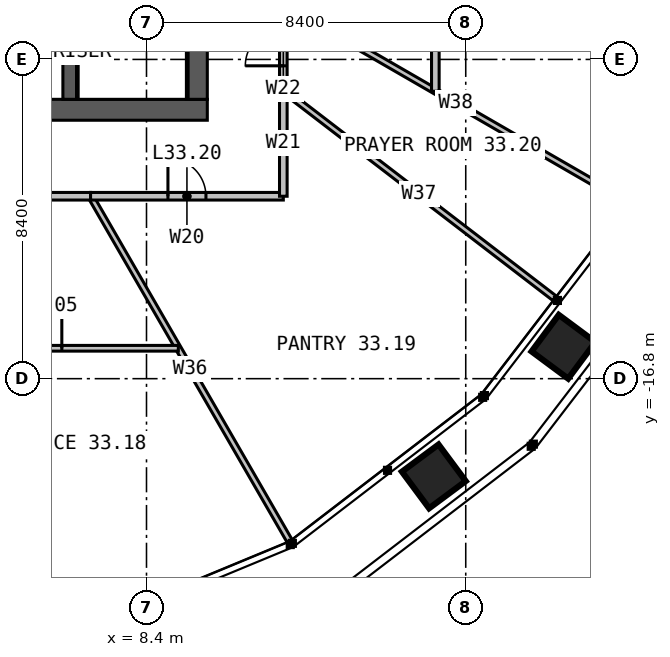
"""IFC4 building model, lengths in metres.
Left out: names, types, materials, properties, quantities, classifications, styles, units other than length and angle.
Written with IfcOpenShell. Run it as: python <this file> out.ifc"""

import sys

from ifc_helpers import new_model, si_unit, direction, frame, frame_2d, origin, place, context, subcontext, project, spatial, rectangle, extrude, element, fill, save


model = new_model("IFC4")
c1 = context("Model", 3, precision=1e-05, world=origin(), true_north=direction((0.0, 1.0)))
c2 = subcontext(c1, "Body", "Model", "MODEL_VIEW")
j1 = project(units=[si_unit("LENGTHUNIT", "METRE"), si_unit("PLANEANGLEUNIT", "RADIAN")], contexts=[c1])
p1 = place(None, origin())
s1 = spatial("IfcSite", under=j1, at=p1, CompositionType="ELEMENT")
p2 = place(p1, origin())
s2 = spatial("IfcBuilding", under=s1, at=p2, CompositionType="ELEMENT")
p3 = place(p2, frame((0.0, 0.0, 138.0)))
s3 = spatial("IfcBuildingStorey", under=s2, at=p3, CompositionType="ELEMENT", Elevation=138.0)
p4 = place(p3, frame((10.0, -9.725, 0.0), z_axis=(0.0, 0.0, 1.0), x_axis=(-1.0, 0.0, 0.0)))
e1 = element("IfcWall", 1, at=p4, inside=s3, PredefinedType="SOLIDWALL", context=c2, shape_type="SweptSolid", body=[
    extrude(rectangle(XDim=20.0, YDim=0.55, at=frame_2d((10.0, 0.0))), origin(), (0.0, 0.0, 1.0), 4.0),
])
p5 = place(p4, frame((6.875, 0.0, 0.0)))
e2 = element("IfcOpeningElement", 2, at=p5, cuts=e1, PredefinedType="OPENING", context=c2, shape_type="SweptSolid", body=[
    extrude(rectangle(XDim=1.2, YDim=2.2, at=frame_2d((0.6, 1.1))), frame((0.0, 0.285, 0.0), z_axis=(0.0, -1.0, 0.0), x_axis=(1.0, 0.0, 0.0)), (0.0, 0.0, 1.0), 0.57),
])
p6 = place(p3, frame((9.725, -9.45, 0.0), z_axis=(0.0, 0.0, 1.0), x_axis=(0.0, 1.0, 0.0)))
e3 = element("IfcWall", 3, at=p6, inside=s3, PredefinedType="SOLIDWALL", context=c2, shape_type="SweptSolid", body=[
    extrude(rectangle(XDim=18.9, YDim=0.55, at=frame_2d((9.45, 0.0))), origin(), (0.0, 0.0, 1.0), 4.0),
])
p7 = place(p3, frame((6.4, 9.45, 0.0), z_axis=(0.0, 0.0, 1.0), x_axis=(0.0, -1.0, 0.0)))
e4 = element("IfcWall", 4, at=p7, inside=s3, PredefinedType="SOLIDWALL", context=c2, shape_type="SweptSolid", body=[
    extrude(rectangle(XDim=18.9, YDim=0.4, at=frame_2d((9.45, 0.0))), origin(), (0.0, 0.0, 1.0), 4.0),
])
p8 = place(p7, frame((8.95, 0.0, 0.0)))
e5 = element("IfcOpeningElement", 5, at=p8, cuts=e4, PredefinedType="OPENING", context=c2, shape_type="SweptSolid", body=[
    extrude(rectangle(XDim=1.0, YDim=2.2, at=frame_2d((0.5, 1.1))), frame((0.0, 0.21, 0.0), z_axis=(0.0, -1.0, 0.0), x_axis=(1.0, 0.0, 0.0)), (0.0, 0.0, 1.0), 0.42),
])
for number, where, z_axis, x_axis in (
    (6, (12.0, -6.928, 0.0), (0.0, 0.0, 1.0), (0.866, -0.5, 0.0)),
    (7, (6.928, -12.0, 0.0), (0.0, 0.0, 1.0), (0.5, -0.866, 0.0)),
):
    element("IfcWall", number, at=place(p3, frame(where, z_axis=z_axis, x_axis=x_axis)), inside=s3, PredefinedType="PARTITIONING", context=c2, shape_type="SweptSolid", body=[
        extrude(rectangle(XDim=10.478, YDim=0.15, at=frame_2d((5.239, 0.0))), origin(), (0.0, 0.0, 1.0), 2.79),
    ])
p9 = place(p3, frame((12.0, -9.208, 0.0), z_axis=(0.0, 0.0, 1.0), x_axis=(0.79335350297, -0.608761217002, 0.0)))
e8 = element("IfcWall", 8, at=p9, inside=s3, PredefinedType="PARTITIONING", context=c2, shape_type="SweptSolid", body=[
    extrude(rectangle(XDim=9.0, YDim=0.15, at=frame_2d((4.5, 0.0))), origin(), (0.0, 0.0, 1.0), 2.79),
])
p10 = place(p3, frame((16.0, -9.238, 0.0), z_axis=(0.0, 0.0, 1.0), x_axis=(0.0, 1.0, 0.0)))
e9 = element("IfcWall", 9, at=p10, inside=s3, PredefinedType="PARTITIONING", context=c2, shape_type="SweptSolid", body=[
    extrude(rectangle(XDim=2.802, YDim=0.2, at=frame_2d((1.401, 0.0))), origin(), (0.0, 0.0, 1.0), 3.8),
])
p11 = place(p3, frame((-9.238, -16.0, 0.0), z_axis=(0.0, 0.0, 1.0), x_axis=(1.0, 0.0, 0.0)))
e10 = element("IfcWall", 10, at=p11, inside=s3, PredefinedType="PARTITIONING", context=c2, shape_type="SweptSolid", body=[
    extrude(rectangle(XDim=18.475, YDim=0.15, at=frame_2d((9.238, 0.0))), origin(), (0.0, 0.0, 1.0), 2.79),
])
p12 = place(p11, frame((3.066, 0.0, 0.0)))
e11 = element("IfcOpeningElement", 11, at=p12, cuts=e10, PredefinedType="OPENING", context=c2, shape_type="SweptSolid", body=[
    extrude(rectangle(XDim=1.0, YDim=2.2, at=frame_2d((0.5, 1.1))), frame((0.0, 0.085, 0.0), z_axis=(0.0, -1.0, 0.0), x_axis=(1.0, 0.0, 0.0)), (0.0, 0.0, 1.0), 0.17),
])
p13 = place(p11, frame((8.738, 0.0, 0.0)))
e12 = element("IfcOpeningElement", 12, at=p13, cuts=e10, PredefinedType="OPENING", context=c2, shape_type="SweptSolid", body=[
    extrude(rectangle(XDim=1.0, YDim=2.2, at=frame_2d((0.5, 1.1))), frame((0.0, 0.085, 0.0), z_axis=(0.0, -1.0, 0.0), x_axis=(1.0, 0.0, 0.0)), (0.0, 0.0, 1.0), 0.17),
])
p14 = place(p11, frame((14.41, 0.0, 0.0)))
e13 = element("IfcOpeningElement", 13, at=p14, cuts=e10, PredefinedType="OPENING", context=c2, shape_type="SweptSolid", body=[
    extrude(rectangle(XDim=1.0, YDim=2.2, at=frame_2d((0.5, 1.1))), frame((0.0, 0.085, 0.0), z_axis=(0.0, -1.0, 0.0), x_axis=(1.0, 0.0, 0.0)), (0.0, 0.0, 1.0), 0.17),
])
p15 = place(p3, frame((-6.928, -12.0, 0.0), z_axis=(0.0, 0.0, 1.0), x_axis=(1.0, 0.0, 0.0)))
e14 = element("IfcWall", 14, at=p15, inside=s3, PredefinedType="PARTITIONING", context=c2, shape_type="SweptSolid", body=[
    extrude(rectangle(XDim=13.856, YDim=0.2, at=frame_2d((6.928, 0.0))), origin(), (0.0, 0.0, 1.0), 3.8),
])
p16 = place(p15, frame((6.028, 0.0, 0.0)))
e15 = element("IfcOpeningElement", 15, at=p16, cuts=e14, PredefinedType="OPENING", context=c2, shape_type="SweptSolid", body=[
    extrude(rectangle(XDim=1.8, YDim=2.2, at=frame_2d((0.9, 1.1))), frame((0.0, 0.11, 0.0), z_axis=(0.0, -1.0, 0.0), x_axis=(1.0, 0.0, 0.0)), (0.0, 0.0, 1.0), 0.22),
])
p17 = place(p3, frame((6.928, -12.0, 0.0), z_axis=(0.0, 0.0, 1.0), x_axis=(1.0, 0.0, 0.0)))
e16 = element("IfcWall", 16, at=p17, inside=s3, PredefinedType="PARTITIONING", context=c2, shape_type="SweptSolid", body=[
    extrude(rectangle(XDim=5.072, YDim=0.2, at=frame_2d((2.536, 0.0))), origin(), (0.0, 0.0, 1.0), 3.8),
])
p18 = place(p17, frame((2.036, 0.0, 0.0)))
e17 = element("IfcOpeningElement", 17, at=p18, cuts=e16, PredefinedType="OPENING", context=c2, shape_type="SweptSolid", body=[
    extrude(rectangle(XDim=1.0, YDim=2.2, at=frame_2d((0.5, 1.1))), frame((0.0, 0.11, 0.0), z_axis=(0.0, -1.0, 0.0), x_axis=(1.0, 0.0, 0.0)), (0.0, 0.0, 1.0), 0.22),
])
p19 = place(p3, frame((12.0, -12.0, 0.0), z_axis=(0.0, 0.0, 1.0), x_axis=(0.0, 1.0, 0.0)))
e18 = element("IfcWall", 18, at=p19, inside=s3, PredefinedType="PARTITIONING", context=c2, shape_type="SweptSolid", body=[
    extrude(rectangle(XDim=2.792, YDim=0.2, at=frame_2d((1.396, 0.0))), origin(), (0.0, 0.0, 1.0), 3.8),
])
p20 = place(p3, frame((12.0, -9.208, 0.0), z_axis=(0.0, 0.0, 1.0), x_axis=(0.0, 1.0, 0.0)))
e19 = element("IfcWall", 19, at=p20, inside=s3, PredefinedType="PARTITIONING", context=c2, shape_type="SweptSolid", body=[
    extrude(rectangle(XDim=2.28, YDim=0.2, at=frame_2d((1.14, 0.0))), origin(), (0.0, 0.0, 1.0), 3.8),
])
p21 = place(p20, frame((0.64, 0.0, 0.0)))
e20 = element("IfcOpeningElement", 20, at=p21, cuts=e19, PredefinedType="OPENING", context=c2, shape_type="SweptSolid", body=[
    extrude(rectangle(XDim=1.0, YDim=2.2, at=frame_2d((0.5, 1.1))), frame((0.0, 0.11, 0.0), z_axis=(0.0, -1.0, 0.0), x_axis=(1.0, 0.0, 0.0)), (0.0, 0.0, 1.0), 0.22),
])
p22 = place(p14, origin())
e21 = element("IfcDoor", 21, at=p22, inside=s3, OperationType="SINGLE_SWING_RIGHT", PredefinedType="DOOR", context=c2, shape_type="SweptSolid", body=[
    extrude(rectangle(XDim=1.0, YDim=2.2, at=frame_2d((0.5, 1.1))), frame((0.0, 0.025, 0.0), z_axis=(0.0, -1.0, 0.0), x_axis=(1.0, 0.0, 0.0)), (0.0, 0.0, 1.0), 0.05),
])
fill(e13, e21)
p23 = place(p18, origin())
e22 = element("IfcDoor", 22, at=p23, inside=s3, OperationType="SINGLE_SWING_LEFT", PredefinedType="DOOR", context=c2, shape_type="SweptSolid", body=[
    extrude(rectangle(XDim=1.0, YDim=2.2, at=frame_2d((0.5, 1.1))), frame((0.0, 0.025, 0.0), z_axis=(0.0, -1.0, 0.0), x_axis=(1.0, 0.0, 0.0)), (0.0, 0.0, 1.0), 0.05),
])
fill(e17, e22)
p24 = place(p21, origin())
e23 = element("IfcDoor", 23, at=p24, inside=s3, OperationType="SINGLE_SWING_LEFT", PredefinedType="DOOR", context=c2, shape_type="SweptSolid", body=[
    extrude(rectangle(XDim=1.0, YDim=2.2, at=frame_2d((0.5, 1.1))), frame((0.0, 0.025, 0.0), z_axis=(0.0, -1.0, 0.0), x_axis=(1.0, 0.0, 0.0)), (0.0, 0.0, 1.0), 0.05),
])
fill(e20, e23)
save(model, sys.argv[1])
